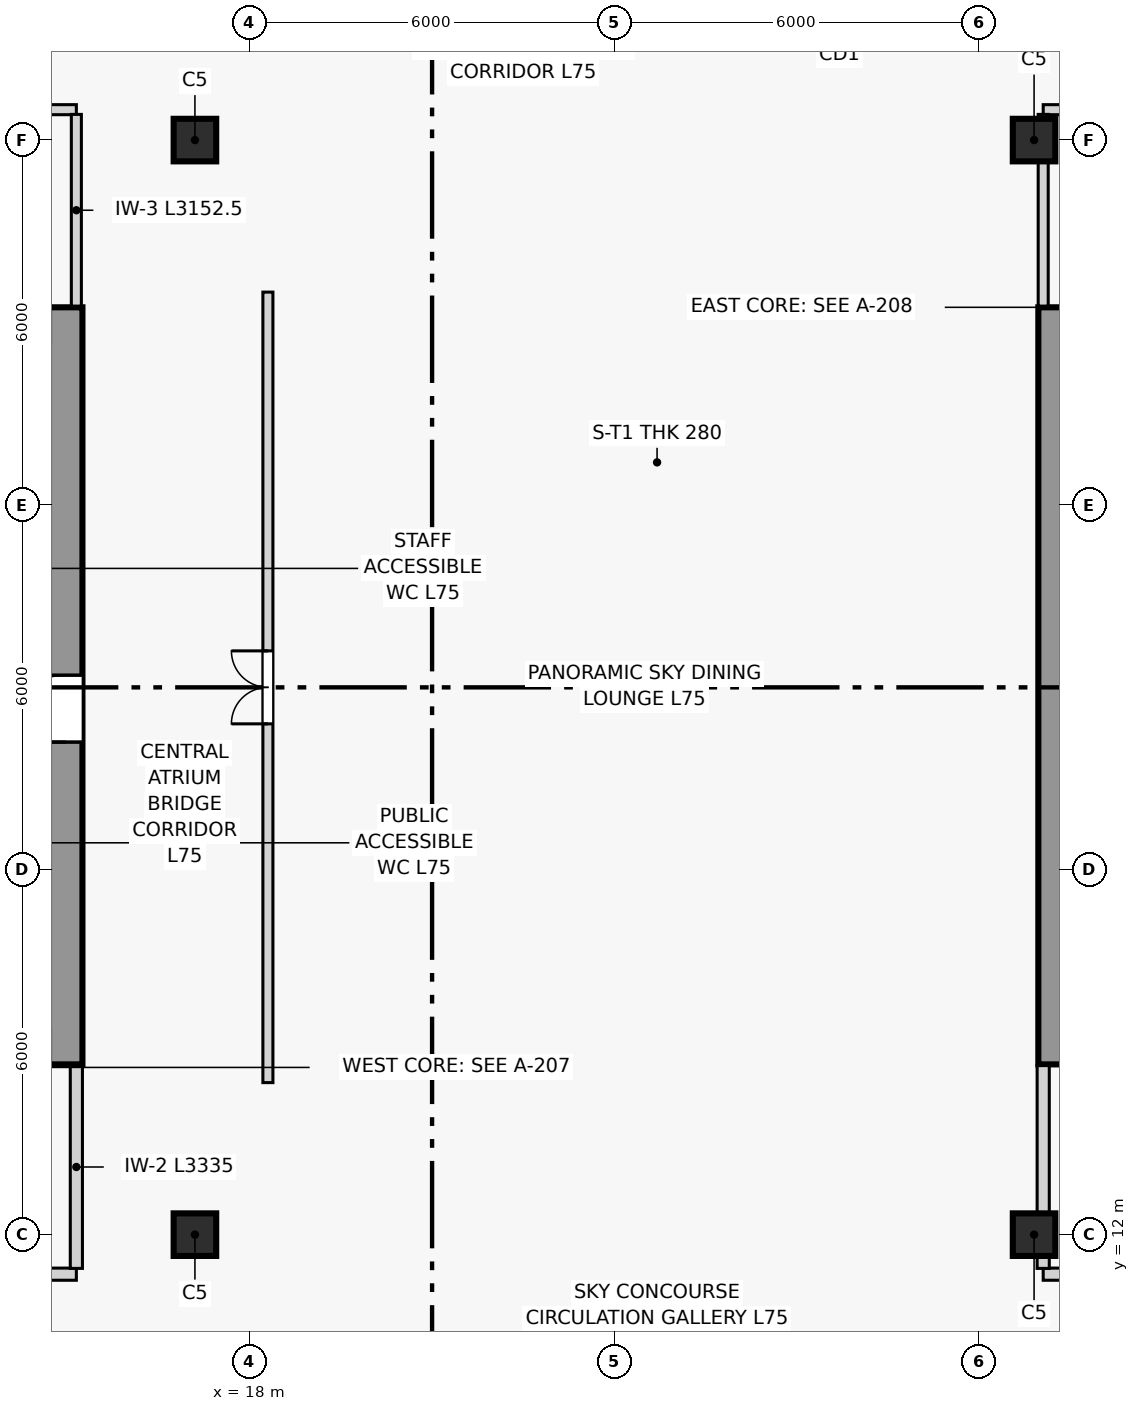
"""IFC4 building model, lengths in metres.
Left out: names, types, materials, properties, quantities, classifications, styles, units other than length and angle.
Written with IfcOpenShell. Run it as: python <this file> out.ifc"""

import sys

from ifc_helpers import new_model, si_unit, direction, frame, frame_2d, origin, origin_2d, place, context, subcontext, project, spatial, rectangle, extrude, source, transform, mapped, element, fill, save


model = new_model("IFC4")
c1 = context("Model", 3, precision=1e-05, world=origin(), true_north=direction((0.0, 1.0)))
c2 = subcontext(c1, "Body", "Model", "MODEL_VIEW")
j1 = project(units=[si_unit("LENGTHUNIT", "METRE"), si_unit("PLANEANGLEUNIT", "RADIAN")], contexts=[c1])
p1 = place(None, origin())
s1 = spatial("IfcSite", under=j1, at=p1, CompositionType="ELEMENT")
p2 = place(p1, origin())
s2 = spatial("IfcBuilding", under=s1, at=p2, CompositionType="ELEMENT")
p3 = place(p2, frame((0.0, 0.0, 285.3)))
s3 = spatial("IfcBuildingStorey", under=s2, at=p3, CompositionType="ELEMENT", Elevation=285.3)
p4 = place(p3, frame((14.975, 14.8, 0.0), z_axis=(0.0, 0.0, 1.0), x_axis=(0.0, 1.0, 0.0)))
e1 = element("IfcWall", 1, at=p4, inside=s3, PredefinedType="SHEAR", context=c2, shape_type="SweptSolid", body=[
    extrude(rectangle(XDim=12.45, YDim=0.55, at=frame_2d((6.225, 0.0))), origin(), (0.0, 0.0, 1.0), 4.2),
])
p5 = place(p4, frame((5.3, 0.0, 0.0)))
e2 = element("IfcOpeningElement", 2, at=p5, cuts=e1, PredefinedType="OPENING", context=c2, shape_type="SweptSolid", body=[
    extrude(rectangle(XDim=1.1, YDim=2.2, at=frame_2d((0.55, 1.1))), frame((0.0, 0.285, 0.0), z_axis=(0.0, -1.0, 0.0), x_axis=(1.0, 0.0, 0.0)), (0.0, 0.0, 1.0), 0.57),
])
p6 = place(p3, frame((31.245, 14.8, 0.0), z_axis=(0.0, 0.0, 1.0), x_axis=(0.0, 1.0, 0.0)))
e3 = element("IfcWall", 3, at=p6, inside=s3, PredefinedType="SHEAR", context=c2, shape_type="SweptSolid", body=[
    extrude(rectangle(XDim=12.45, YDim=0.55, at=frame_2d((6.225, 0.0))), origin(), (0.0, 0.0, 1.0), 4.2),
])
m1 = source(origin(), c2, "Body", "SweptSolid", [
    extrude(rectangle(XDim=0.7, YDim=0.7, at=origin_2d()), origin(), (0.0, 0.0, 1.0), 4.2),
])
for number, where, z_axis, x_axis in (
    (4, (17.1, 12.0, 0.0), (0.0, 0.0, 1.0), (1.0, 0.0, 0.0)),
    (5, (17.1, 30.0, 0.0), (0.0, 0.0, 1.0), (1.0, 0.0, 0.0)),
    (6, (30.9, 12.0, 0.0), (0.0, 0.0, 1.0), (1.0, 0.0, 0.0)),
    (7, (30.9, 30.0, 0.0), (0.0, 0.0, 1.0), (1.0, 0.0, 0.0)),
):
    element("IfcColumn", number, at=place(p3, frame(where, z_axis=z_axis, x_axis=x_axis)), inside=s3, PredefinedType="COLUMN", context=c2, shape_type="MappedRepresentation", body=[
        mapped(m1, transform((0.0, 0.0, 0.0), scale=1.0)),
    ])
p7 = place(p3, frame((8.05, 11.35, 0.0), z_axis=(0.0, 0.0, 1.0), x_axis=(1.0, 0.0, 0.0)))
e8 = element("IfcWall", 8, at=p7, inside=s3, PredefinedType="PARTITIONING", context=c2, shape_type="SweptSolid", body=[
    extrude(rectangle(XDim=7.1, YDim=0.2, at=frame_2d((3.55, 0.0))), origin(), (0.0, 0.0, 1.0), 3.92),
])
p8 = place(p7, frame((2.846, 0.0, 0.0)))
e9 = element("IfcOpeningElement", 9, at=p8, cuts=e8, PredefinedType="OPENING", context=c2, shape_type="SweptSolid", body=[
    extrude(rectangle(XDim=1.2, YDim=2.2, at=frame_2d((0.6, 1.1))), frame((0.0, 0.11, 0.0), z_axis=(0.0, -1.0, 0.0), x_axis=(1.0, 0.0, 0.0)), (0.0, 0.0, 1.0), 0.22),
])
p9 = place(p3, frame((15.15, 11.445, 0.0), z_axis=(0.0, 0.0, 1.0), x_axis=(0.0, 1.0, 0.0)))
e10 = element("IfcWall", 10, at=p9, inside=s3, PredefinedType="PARTITIONING", context=c2, shape_type="SweptSolid", body=[
    extrude(rectangle(XDim=3.335, YDim=0.2, at=frame_2d((1.667, 0.0))), origin(), (0.0, 0.0, 1.0), 3.92),
])
p10 = place(p3, frame((31.05, 11.35, 0.0), z_axis=(0.0, 0.0, 1.0), x_axis=(1.0, 0.0, 0.0)))
e11 = element("IfcWall", 11, at=p10, inside=s3, PredefinedType="PARTITIONING", context=c2, shape_type="SweptSolid", body=[
    extrude(rectangle(XDim=6.2, YDim=0.2, at=frame_2d((3.1, 0.0))), origin(), (0.0, 0.0, 1.0), 3.92),
])
p11 = place(p10, frame((2.586, 0.0, 0.0)))
e12 = element("IfcOpeningElement", 12, at=p11, cuts=e11, PredefinedType="OPENING", context=c2, shape_type="SweptSolid", body=[
    extrude(rectangle(XDim=1.2, YDim=2.2, at=frame_2d((0.6, 1.1))), frame((0.0, 0.11, 0.0), z_axis=(0.0, -1.0, 0.0), x_axis=(1.0, 0.0, 0.0)), (0.0, 0.0, 1.0), 0.22),
])
p12 = place(p3, frame((31.05, 11.445, 0.0), z_axis=(0.0, 0.0, 1.0), x_axis=(0.0, 1.0, 0.0)))
e13 = element("IfcWall", 13, at=p12, inside=s3, PredefinedType="PARTITIONING", context=c2, shape_type="SweptSolid", body=[
    extrude(rectangle(XDim=3.335, YDim=0.2, at=frame_2d((1.667, 0.0))), origin(), (0.0, 0.0, 1.0), 3.07),
])
p13 = place(p3, frame((8.05, 30.5, 0.0), z_axis=(0.0, 0.0, 1.0), x_axis=(1.0, 0.0, 0.0)))
e14 = element("IfcWall", 14, at=p13, inside=s3, PredefinedType="PARTITIONING", context=c2, shape_type="SweptSolid", body=[
    extrude(rectangle(XDim=7.1, YDim=0.165, at=frame_2d((3.55, 0.0))), origin(), (0.0, 0.0, 1.0), 3.92),
])
p14 = place(p13, frame((2.95, 0.0, 0.0)))
e15 = element("IfcOpeningElement", 15, at=p14, cuts=e14, PredefinedType="OPENING", context=c2, shape_type="SweptSolid", body=[
    extrude(rectangle(XDim=1.2, YDim=2.2, at=frame_2d((0.6, 1.1))), frame((0.0, 0.093, 0.0), z_axis=(0.0, -1.0, 0.0), x_axis=(1.0, 0.0, 0.0)), (0.0, 0.0, 1.0), 0.185),
])
p15 = place(p3, frame((15.15, 27.27, 0.0), z_axis=(0.0, 0.0, 1.0), x_axis=(0.0, 1.0, 0.0)))
e16 = element("IfcWall", 16, at=p15, inside=s3, PredefinedType="PARTITIONING", context=c2, shape_type="SweptSolid", body=[
    extrude(rectangle(XDim=3.153, YDim=0.165, at=frame_2d((1.576, 0.0))), origin(), (0.0, 0.0, 1.0), 3.92),
])
p16 = place(p3, frame((31.05, 30.5, 0.0), z_axis=(0.0, 0.0, 1.0), x_axis=(1.0, 0.0, 0.0)))
e17 = element("IfcWall", 17, at=p16, inside=s3, PredefinedType="PARTITIONING", context=c2, shape_type="SweptSolid", body=[
    extrude(rectangle(XDim=6.2, YDim=0.165, at=frame_2d((3.1, 0.0))), origin(), (0.0, 0.0, 1.0), 3.92),
])
p17 = place(p16, frame((2.5, 0.0, 0.0)))
e18 = element("IfcOpeningElement", 18, at=p17, cuts=e17, PredefinedType="OPENING", context=c2, shape_type="SweptSolid", body=[
    extrude(rectangle(XDim=1.2, YDim=2.2, at=frame_2d((0.6, 1.1))), frame((0.0, 0.093, 0.0), z_axis=(0.0, -1.0, 0.0), x_axis=(1.0, 0.0, 0.0)), (0.0, 0.0, 1.0), 0.185),
])
p18 = place(p3, frame((31.05, 27.27, 0.0), z_axis=(0.0, 0.0, 1.0), x_axis=(0.0, 1.0, 0.0)))
e19 = element("IfcWall", 19, at=p18, inside=s3, PredefinedType="PARTITIONING", context=c2, shape_type="SweptSolid", body=[
    extrude(rectangle(XDim=3.153, YDim=0.165, at=frame_2d((1.576, 0.0))), origin(), (0.0, 0.0, 1.0), 3.92),
])
p19 = place(p3, frame((18.3, 14.5, 0.0), z_axis=(0.0, 0.0, 1.0), x_axis=(0.0, 1.0, 0.0)))
e20 = element("IfcWall", 20, at=p19, inside=s3, PredefinedType="PARTITIONING", context=c2, shape_type="SweptSolid", body=[
    extrude(rectangle(XDim=13.0, YDim=0.165, at=frame_2d((6.5, 0.0))), origin(), (0.0, 0.0, 1.0), 3.92),
])
p20 = place(p19, frame((5.9, 0.0, 0.0)))
e21 = element("IfcOpeningElement", 21, at=p20, cuts=e20, PredefinedType="OPENING", context=c2, shape_type="SweptSolid", body=[
    extrude(rectangle(XDim=1.2, YDim=2.2, at=frame_2d((0.6, 1.1))), frame((0.0, 0.093, 0.0), z_axis=(0.0, -1.0, 0.0), x_axis=(1.0, 0.0, 0.0)), (0.0, 0.0, 1.0), 0.185),
])
m2 = source(origin(), c2, "Body", "SweptSolid", [
    extrude(rectangle(XDim=1.1, YDim=2.2, at=frame_2d((0.55, 1.1))), frame((0.0, 0.025, 0.0), z_axis=(0.0, -1.0, 0.0), x_axis=(1.0, 0.0, 0.0)), (0.0, 0.0, 1.0), 0.05),
])
p21 = place(p5, origin())
e22 = element("IfcDoor", 22, at=p21, inside=s3, OperationType="SINGLE_SWING_LEFT", PredefinedType="DOOR", context=c2, shape_type="MappedRepresentation", body=[
    mapped(m2, transform((0.0, 0.0, 0.0), scale=1.0)),
])
fill(e2, e22)
m3 = source(origin(), c2, "Body", "SweptSolid", [
    extrude(rectangle(XDim=1.2, YDim=2.2, at=frame_2d((0.6, 1.1))), frame((0.0, 0.025, 0.0), z_axis=(0.0, -1.0, 0.0), x_axis=(1.0, 0.0, 0.0)), (0.0, 0.0, 1.0), 0.05),
])
p22 = place(p20, origin())
e23 = element("IfcDoor", 23, at=p22, inside=s3, OperationType="DOUBLE_DOOR_SINGLE_SWING", PredefinedType="DOOR", context=c2, shape_type="MappedRepresentation", body=[
    mapped(m3, transform((0.0, 0.0, 0.0), scale=1.0)),
])
fill(e21, e23)
save(model, sys.argv[1])
